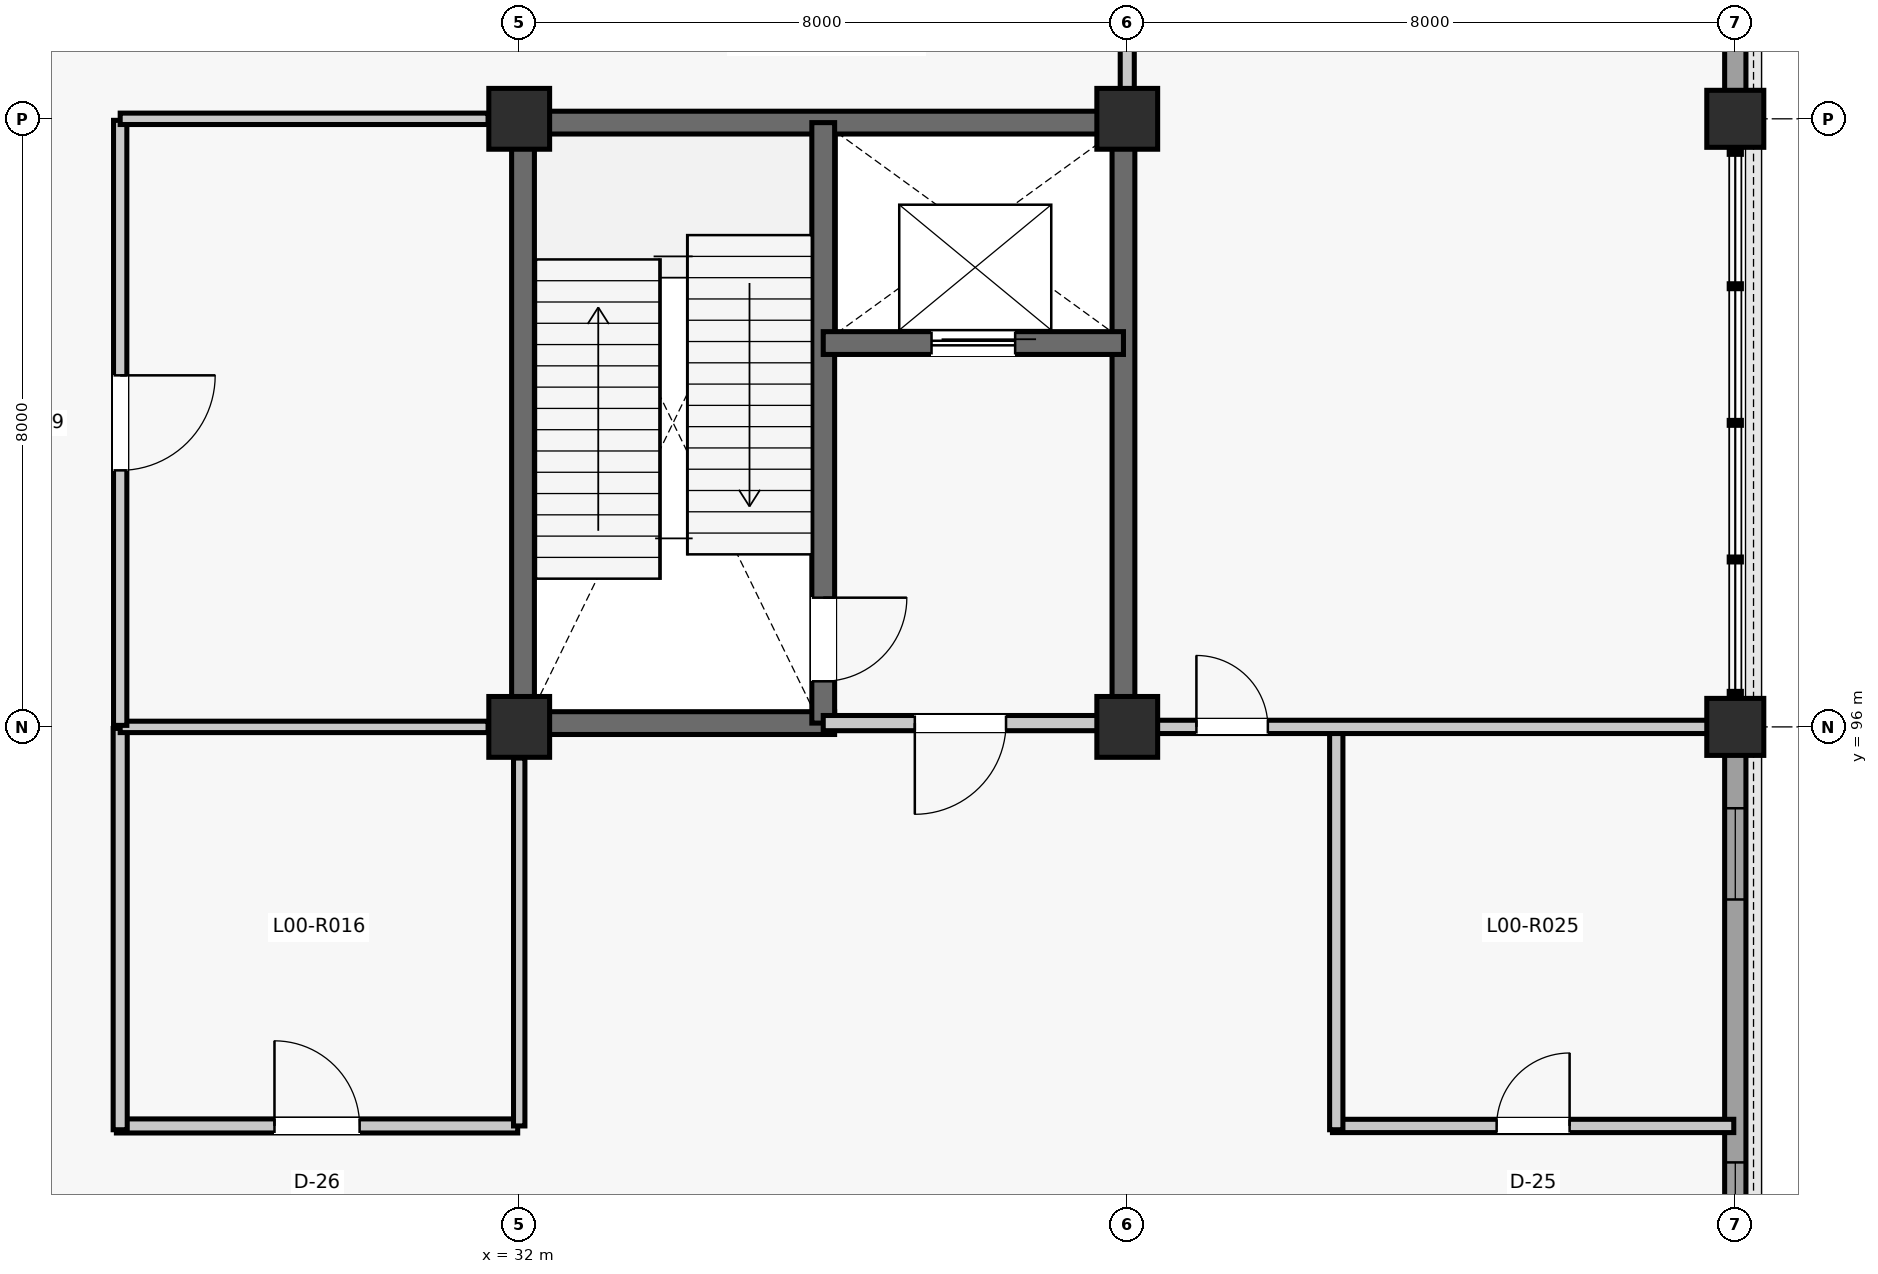
"""IFC4 building model, lengths in metres.
Left out: names, types, materials, properties, quantities, classifications, styles, units other than length and angle.
Written with IfcOpenShell. Run it as: python <this file> out.ifc"""

import sys

from ifc_helpers import new_model, si_unit, direction, frame, frame_2d, origin, origin_2d, place, context, subcontext, project, spatial, rectangle, extrude, element, fill, save


model = new_model("IFC4")
c1 = context("Model", 3, precision=1e-05, world=origin(), true_north=direction((0.0, 1.0)))
c2 = subcontext(c1, "Body", "Model", "MODEL_VIEW")
j1 = project(units=[si_unit("LENGTHUNIT", "METRE"), si_unit("PLANEANGLEUNIT", "RADIAN")], contexts=[c1])
p1 = place(None, origin())
s1 = spatial("IfcSite", under=j1, at=p1, CompositionType="ELEMENT")
p2 = place(p1, origin())
s2 = spatial("IfcBuilding", under=s1, at=p2, CompositionType="ELEMENT")
p3 = place(p2, origin())
s3 = spatial("IfcBuildingStorey", under=s2, at=p3, CompositionType="ELEMENT", Elevation=0.0)
for number, where, z_axis, x_axis in (
    (1, (32.0, 96.0, 0.0), (0.0, 0.0, 1.0), (1.0, 0.0, 0.0)),
    (2, (32.0, 104.0, 0.0), (0.0, 0.0, 1.0), (1.0, 0.0, 0.0)),
    (3, (40.0, 96.0, 0.0), (0.0, 0.0, 1.0), (1.0, 0.0, 0.0)),
    (4, (40.0, 104.0, 0.0), (0.0, 0.0, 1.0), (1.0, 0.0, 0.0)),
):
    element("IfcColumn", number, at=place(p3, frame(where, z_axis=z_axis, x_axis=x_axis)), inside=s3, PredefinedType="COLUMN", context=c2, shape_type="SweptSolid", body=[
        extrude(rectangle(XDim=0.8, YDim=0.8, at=origin_2d()), origin(), (0.0, 0.0, 1.0), 5.28),
    ])
for number, where, z_axis, x_axis in (
    (5, (48.0, 96.0, 0.0), (0.0, 0.0, 1.0), (1.0, 0.0, 0.0)),
    (6, (48.0, 104.0, 0.0), (0.0, 0.0, 1.0), (1.0, 0.0, 0.0)),
):
    element("IfcColumn", number, at=place(p3, frame(where, z_axis=z_axis, x_axis=x_axis)), inside=s3, PredefinedType="COLUMN", context=c2, shape_type="SweptSolid", body=[
        extrude(rectangle(XDim=0.75, YDim=0.75, at=origin_2d()), origin(), (0.0, 0.0, 1.0), 5.28),
    ])
p4 = place(p3, frame((48.0, 88.36, 0.0), z_axis=(0.0, 0.0, 1.0), x_axis=(0.0, 1.0, 0.0)))
e7 = element("IfcWall", 7, at=p4, inside=s3, PredefinedType="SOLIDWALL", context=c2, shape_type="SweptSolid", body=[
    extrude(rectangle(XDim=7.28, YDim=0.28, at=frame_2d((3.64, 0.0))), origin(), (0.0, 0.0, 1.0), 4.674),
])
p5 = place(p4, frame((0.71, 0.0, 0.95)))
e8 = element("IfcOpeningElement", 8, at=p5, cuts=e7, PredefinedType="OPENING", context=c2, shape_type="SweptSolid", body=[
    extrude(rectangle(XDim=1.2, YDim=1.8, at=frame_2d((0.6, 0.9))), frame((0.0, 0.15, 0.0), z_axis=(0.0, -1.0, 0.0), x_axis=(1.0, 0.0, 0.0)), (0.0, 0.0, 1.0), 0.3),
])
p6 = place(p4, frame((5.37, 0.0, 0.95)))
e9 = element("IfcOpeningElement", 9, at=p6, cuts=e7, PredefinedType="OPENING", context=c2, shape_type="SweptSolid", body=[
    extrude(rectangle(XDim=1.2, YDim=1.8, at=frame_2d((0.6, 0.9))), frame((0.0, 0.15, 0.0), z_axis=(0.0, -1.0, 0.0), x_axis=(1.0, 0.0, 0.0)), (0.0, 0.0, 1.0), 0.3),
])
p7 = place(p3, frame((48.0, 104.36, 0.0), z_axis=(0.0, 0.0, 1.0), x_axis=(0.0, 1.0, 0.0)))
e10 = element("IfcWall", 10, at=p7, inside=s3, PredefinedType="SOLIDWALL", context=c2, shape_type="SweptSolid", body=[
    extrude(rectangle(XDim=7.28, YDim=0.28, at=frame_2d((3.64, 0.0))), origin(), (0.0, 0.0, 1.0), 4.677),
])
p8 = place(p7, frame((2.715, 0.0, 0.9)))
e11 = element("IfcOpeningElement", 11, at=p8, cuts=e10, PredefinedType="OPENING", context=c2, shape_type="SweptSolid", body=[
    extrude(rectangle(XDim=1.85, YDim=2.65, at=frame_2d((0.925, 1.325))), frame((0.0, 0.15, 0.0), z_axis=(0.0, -1.0, 0.0), x_axis=(1.0, 0.0, 0.0)), (0.0, 0.0, 1.0), 0.3),
])
for number, where, z_axis, x_axis in (
    (12, (32.05, 96.29, 0.0), (0.0, 0.0, 1.0), (0.0, 1.0, 0.0)),
    (13, (32.29, 103.95, 0.0), (0.0, 0.0, 1.0), (1.0, 0.0, 0.0)),
    (14, (39.95, 96.29, 0.0), (0.0, 0.0, 1.0), (0.0, 1.0, 0.0)),
):
    element("IfcWall", number, at=place(p3, frame(where, z_axis=z_axis, x_axis=x_axis)), inside=s3, PredefinedType="SHEAR", context=c2, shape_type="SweptSolid", body=[
        extrude(rectangle(XDim=7.42, YDim=0.3, at=frame_2d((3.71, 0.0))), origin(), (0.0, 0.0, 1.0), 5.035),
    ])
p9 = place(p3, frame((32.29, 96.05, 0.0), z_axis=(0.0, 0.0, 1.0), x_axis=(1.0, 0.0, 0.0)))
e15 = element("IfcWall", 15, at=p9, inside=s3, PredefinedType="SHEAR", context=c2, shape_type="SweptSolid", body=[
    extrude(rectangle(XDim=3.86, YDim=0.3, at=frame_2d((1.93, 0.0))), origin(), (0.0, 0.0, 1.0), 5.035),
])
p10 = place(p3, frame((36.0, 96.05, 0.0), z_axis=(0.0, 0.0, 1.0), x_axis=(0.0, 1.0, 0.0)))
e16 = element("IfcWall", 16, at=p10, inside=s3, PredefinedType="SHEAR", context=c2, shape_type="SweptSolid", body=[
    extrude(rectangle(XDim=7.9, YDim=0.3, at=frame_2d((3.95, 0.0))), origin(), (0.0, 0.0, 1.0), 5.035),
])
p11 = place(p10, frame((0.55, 0.0, 0.0)))
e17 = element("IfcOpeningElement", 17, at=p11, cuts=e16, PredefinedType="OPENING", context=c2, shape_type="SweptSolid", body=[
    extrude(rectangle(XDim=1.1, YDim=2.15, at=frame_2d((0.55, 1.075))), frame((0.0, 0.16, 0.0), z_axis=(0.0, -1.0, 0.0), x_axis=(1.0, 0.0, 0.0)), (0.0, 0.0, 1.0), 0.32),
])
p12 = place(p3, frame((36.0, 101.05, 0.0), z_axis=(0.0, 0.0, 1.0), x_axis=(1.0, 0.0, 0.0)))
e18 = element("IfcWall", 18, at=p12, inside=s3, PredefinedType="SHEAR", context=c2, shape_type="SweptSolid", body=[
    extrude(rectangle(XDim=3.95, YDim=0.3, at=frame_2d((1.975, 0.0))), origin(), (0.0, 0.0, 1.0), 5.035),
])
p13 = place(p12, frame((1.425, 0.0, 0.0)))
e19 = element("IfcOpeningElement", 19, at=p13, cuts=e18, PredefinedType="OPENING", context=c2, shape_type="SweptSolid", body=[
    extrude(rectangle(XDim=1.1, YDim=2.2, at=frame_2d((0.55, 1.1))), frame((0.0, 0.16, 0.0), z_axis=(0.0, -1.0, 0.0), x_axis=(1.0, 0.0, 0.0)), (0.0, 0.0, 1.0), 0.32),
])
p14 = place(p3, frame((36.0, 96.05, 0.0), z_axis=(0.0, 0.0, 1.0), x_axis=(1.0, 0.0, 0.0)))
e20 = element("IfcWall", 20, at=p14, inside=s3, PredefinedType="PARTITIONING", context=c2, shape_type="SweptSolid", body=[
    extrude(rectangle(XDim=3.61, YDim=0.2, at=frame_2d((1.805, 0.0))), origin(), (0.0, 0.0, 1.0), 4.327),
])
p15 = place(p14, frame((1.205, 0.0, 0.0)))
e21 = element("IfcOpeningElement", 21, at=p15, cuts=e20, PredefinedType="OPENING", context=c2, shape_type="SweptSolid", body=[
    extrude(rectangle(XDim=1.2, YDim=2.15, at=frame_2d((0.6, 1.075))), frame((0.0, 0.11, 0.0), z_axis=(0.0, -1.0, 0.0), x_axis=(1.0, 0.0, 0.0)), (0.0, 0.0, 1.0), 0.22),
])
p16 = place(p3, frame((26.7, 90.75, 0.0), z_axis=(0.0, 0.0, 1.0), x_axis=(1.0, 0.0, 0.0)))
e22 = element("IfcWall", 22, at=p16, inside=s3, PredefinedType="PARTITIONING", context=c2, shape_type="SweptSolid", body=[
    extrude(rectangle(XDim=5.28, YDim=0.185, at=frame_2d((2.64, 0.0))), origin(), (0.0, 0.0, 1.0), 4.471),
])
p17 = place(p16, frame((2.08, 0.0, 0.0)))
e23 = element("IfcOpeningElement", 23, at=p17, cuts=e22, PredefinedType="OPENING", context=c2, shape_type="SweptSolid", body=[
    extrude(rectangle(XDim=1.12, YDim=2.22, at=frame_2d((0.56, 1.11))), frame((0.0, 0.103, 0.0), z_axis=(0.0, -1.0, 0.0), x_axis=(1.0, 0.0, 0.0)), (0.0, 0.0, 1.0), 0.205),
])
p18 = place(p3, frame((26.75, 90.7, 0.0), z_axis=(0.0, 0.0, 1.0), x_axis=(0.0, 1.0, 0.0)))
e24 = element("IfcWall", 24, at=p18, inside=s3, PredefinedType="PARTITIONING", context=c2, shape_type="SweptSolid", body=[
    extrude(rectangle(XDim=5.28, YDim=0.185, at=frame_2d((2.64, 0.0))), origin(), (0.0, 0.0, 1.0), 4.404),
])
p19 = place(p3, frame((26.75, 96.0, 0.0), z_axis=(0.0, 0.0, 1.0), x_axis=(1.0, 0.0, 0.0)))
e25 = element("IfcWall", 25, at=p19, inside=s3, PredefinedType="PARTITIONING", context=c2, shape_type="SweptSolid", body=[
    extrude(rectangle(XDim=4.84, YDim=0.15, at=frame_2d((2.42, 0.0))), origin(), (0.0, 0.0, 1.0), 4.404),
])
p20 = place(p3, frame((32.0, 90.75, 0.0), z_axis=(0.0, 0.0, 1.0), x_axis=(0.0, 1.0, 0.0)))
e26 = element("IfcWall", 26, at=p20, inside=s3, PredefinedType="PARTITIONING", context=c2, shape_type="SweptSolid", body=[
    extrude(rectangle(XDim=4.84, YDim=0.15, at=frame_2d((2.42, 0.0))), origin(), (0.0, 0.0, 1.0), 4.471),
])
p21 = place(p3, frame((26.75, 96.02, 0.0), z_axis=(0.0, 0.0, 1.0), x_axis=(0.0, 1.0, 0.0)))
e27 = element("IfcWall", 27, at=p21, inside=s3, PredefinedType="PARTITIONING", context=c2, shape_type="SweptSolid", body=[
    extrude(rectangle(XDim=7.96, YDim=0.175, at=frame_2d((3.98, 0.0))), origin(), (0.0, 0.0, 1.0), 4.327),
])
p22 = place(p21, frame((3.355, 0.0, 0.0)))
e28 = element("IfcOpeningElement", 28, at=p22, cuts=e27, PredefinedType="OPENING", context=c2, shape_type="SweptSolid", body=[
    extrude(rectangle(XDim=1.25, YDim=2.18, at=frame_2d((0.625, 1.09))), frame((0.0, 0.097, 0.0), z_axis=(0.0, -1.0, 0.0), x_axis=(1.0, 0.0, 0.0)), (0.0, 0.0, 1.0), 0.195),
])
p23 = place(p3, frame((26.75, 104.0, 0.0), z_axis=(0.0, 0.0, 1.0), x_axis=(1.0, 0.0, 0.0)))
e29 = element("IfcWall", 29, at=p23, inside=s3, PredefinedType="PARTITIONING", context=c2, shape_type="SweptSolid", body=[
    extrude(rectangle(XDim=4.84, YDim=0.15, at=frame_2d((2.42, 0.0))), origin(), (0.0, 0.0, 1.0), 4.327),
])
p24 = place(p3, frame((42.7, 90.75, 0.0), z_axis=(0.0, 0.0, 1.0), x_axis=(1.0, 0.0, 0.0)))
e30 = element("IfcWall", 30, at=p24, inside=s3, PredefinedType="PARTITIONING", context=c2, shape_type="SweptSolid", body=[
    extrude(rectangle(XDim=5.28, YDim=0.175, at=frame_2d((2.64, 0.0))), origin(), (0.0, 0.0, 1.0), 4.667),
])
p25 = place(p24, frame((2.16, 0.0, 0.0)))
e31 = element("IfcOpeningElement", 31, at=p25, cuts=e30, PredefinedType="OPENING", context=c2, shape_type="SweptSolid", body=[
    extrude(rectangle(XDim=0.96, YDim=2.14, at=frame_2d((0.48, 1.07))), frame((0.0, 0.097, 0.0), z_axis=(0.0, -1.0, 0.0), x_axis=(1.0, 0.0, 0.0)), (0.0, 0.0, 1.0), 0.195),
])
p26 = place(p3, frame((42.75, 90.7, 0.0), z_axis=(0.0, 0.0, 1.0), x_axis=(0.0, 1.0, 0.0)))
e32 = element("IfcWall", 32, at=p26, inside=s3, PredefinedType="PARTITIONING", context=c2, shape_type="SweptSolid", body=[
    extrude(rectangle(XDim=5.28, YDim=0.175, at=frame_2d((2.64, 0.0))), origin(), (0.0, 0.0, 1.0), 4.403),
])
p27 = place(p3, frame((40.0, 104.39, 0.0), z_axis=(0.0, 0.0, 1.0), x_axis=(0.0, 1.0, 0.0)))
e33 = element("IfcWall", 33, at=p27, inside=s3, PredefinedType="PARTITIONING", context=c2, shape_type="SweptSolid", body=[
    extrude(rectangle(XDim=7.245, YDim=0.185, at=frame_2d((3.623, 0.0))), origin(), (0.0, 0.0, 1.0), 4.404),
])
p28 = place(p27, frame((2.972, 0.0, 0.0)))
e34 = element("IfcOpeningElement", 34, at=p28, cuts=e33, PredefinedType="OPENING", context=c2, shape_type="SweptSolid", body=[
    extrude(rectangle(XDim=1.3, YDim=2.2, at=frame_2d((0.65, 1.1))), frame((0.0, 0.103, 0.0), z_axis=(0.0, -1.0, 0.0), x_axis=(1.0, 0.0, 0.0)), (0.0, 0.0, 1.0), 0.205),
])
p29 = place(p3, frame((40.39, 96.0, 0.0), z_axis=(0.0, 0.0, 1.0), x_axis=(1.0, 0.0, 0.0)))
e35 = element("IfcWall", 35, at=p29, inside=s3, PredefinedType="PARTITIONING", context=c2, shape_type="SweptSolid", body=[
    extrude(rectangle(XDim=7.245, YDim=0.175, at=frame_2d((3.623, 0.0))), origin(), (0.0, 0.0, 1.0), 4.403),
])
p30 = place(p29, frame((0.52, 0.0, 0.0)))
e36 = element("IfcOpeningElement", 36, at=p30, cuts=e35, PredefinedType="OPENING", context=c2, shape_type="SweptSolid", body=[
    extrude(rectangle(XDim=0.94, YDim=2.12, at=frame_2d((0.47, 1.06))), frame((0.0, 0.097, 0.0), z_axis=(0.0, -1.0, 0.0), x_axis=(1.0, 0.0, 0.0)), (0.0, 0.0, 1.0), 0.195),
])
p31 = place(p5, origin())
e37 = element("IfcWindow", 37, at=p31, inside=s3, PartitioningType="SINGLE_PANEL", PredefinedType="WINDOW", context=c2, shape_type="SweptSolid", body=[
    extrude(rectangle(XDim=1.2, YDim=1.8, at=frame_2d((0.6, 0.9))), frame((0.0, 0.03, 0.0), z_axis=(0.0, -1.0, 0.0), x_axis=(1.0, 0.0, 0.0)), (0.0, 0.0, 1.0), 0.06),
])
fill(e8, e37)
p32 = place(p6, origin())
e38 = element("IfcWindow", 38, at=p32, inside=s3, PartitioningType="SINGLE_PANEL", PredefinedType="WINDOW", context=c2, shape_type="SweptSolid", body=[
    extrude(rectangle(XDim=1.2, YDim=1.8, at=frame_2d((0.6, 0.9))), frame((0.0, 0.03, 0.0), z_axis=(0.0, -1.0, 0.0), x_axis=(1.0, 0.0, 0.0)), (0.0, 0.0, 1.0), 0.06),
])
fill(e9, e38)
p33 = place(p11, frame((1.1, 0.0, 0.0), z_axis=(0.0, 0.0, 1.0), x_axis=(-1.0, 0.0, 0.0)))
e39 = element("IfcDoor", 39, at=p33, inside=s3, OperationType="SINGLE_SWING_RIGHT", PredefinedType="DOOR", context=c2, shape_type="SweptSolid", body=[
    extrude(rectangle(XDim=1.1, YDim=2.15, at=frame_2d((0.55, 1.075))), frame((0.0, 0.025, 0.0), z_axis=(0.0, -1.0, 0.0), x_axis=(1.0, 0.0, 0.0)), (0.0, 0.0, 1.0), 0.05),
])
fill(e17, e39)
p34 = place(p13, origin())
e40 = element("IfcDoor", 40, at=p34, inside=s3, OperationType="SLIDING_TO_LEFT", PredefinedType="DOOR", context=c2, shape_type="SweptSolid", body=[
    extrude(rectangle(XDim=1.1, YDim=2.2, at=frame_2d((0.55, 1.1))), frame((0.0, 0.025, 0.0), z_axis=(0.0, -1.0, 0.0), x_axis=(1.0, 0.0, 0.0)), (0.0, 0.0, 1.0), 0.05),
])
fill(e19, e40)
p35 = place(p15, frame((1.2, 0.0, 0.0), z_axis=(0.0, 0.0, 1.0), x_axis=(-1.0, 0.0, 0.0)))
e41 = element("IfcDoor", 41, at=p35, inside=s3, OperationType="SINGLE_SWING_LEFT", PredefinedType="DOOR", context=c2, shape_type="SweptSolid", body=[
    extrude(rectangle(XDim=1.2, YDim=2.15, at=frame_2d((0.6, 1.075))), frame((0.0, 0.025, 0.0), z_axis=(0.0, -1.0, 0.0), x_axis=(1.0, 0.0, 0.0)), (0.0, 0.0, 1.0), 0.05),
])
fill(e21, e41)
p36 = place(p17, origin())
e42 = element("IfcDoor", 42, at=p36, inside=s3, OperationType="SINGLE_SWING_LEFT", PredefinedType="DOOR", context=c2, shape_type="SweptSolid", body=[
    extrude(rectangle(XDim=1.12, YDim=2.22, at=frame_2d((0.56, 1.11))), frame((0.0, 0.025, 0.0), z_axis=(0.0, -1.0, 0.0), x_axis=(1.0, 0.0, 0.0)), (0.0, 0.0, 1.0), 0.05),
])
fill(e23, e42)
p37 = place(p22, frame((1.25, 0.0, 0.0), z_axis=(0.0, 0.0, 1.0), x_axis=(-1.0, 0.0, 0.0)))
e43 = element("IfcDoor", 43, at=p37, inside=s3, OperationType="SINGLE_SWING_RIGHT", PredefinedType="DOOR", context=c2, shape_type="SweptSolid", body=[
    extrude(rectangle(XDim=1.25, YDim=2.18, at=frame_2d((0.625, 1.09))), frame((0.0, 0.025, 0.0), z_axis=(0.0, -1.0, 0.0), x_axis=(1.0, 0.0, 0.0)), (0.0, 0.0, 1.0), 0.05),
])
fill(e28, e43)
p38 = place(p25, origin())
e44 = element("IfcDoor", 44, at=p38, inside=s3, OperationType="SINGLE_SWING_RIGHT", PredefinedType="DOOR", context=c2, shape_type="SweptSolid", body=[
    extrude(rectangle(XDim=0.96, YDim=2.14, at=frame_2d((0.48, 1.07))), frame((0.0, 0.025, 0.0), z_axis=(0.0, -1.0, 0.0), x_axis=(1.0, 0.0, 0.0)), (0.0, 0.0, 1.0), 0.05),
])
fill(e31, e44)
p39 = place(p30, origin())
e45 = element("IfcDoor", 45, at=p39, inside=s3, OperationType="SINGLE_SWING_LEFT", PredefinedType="DOOR", context=c2, shape_type="SweptSolid", body=[
    extrude(rectangle(XDim=0.94, YDim=2.12, at=frame_2d((0.47, 1.06))), frame((0.0, 0.025, 0.0), z_axis=(0.0, -1.0, 0.0), x_axis=(1.0, 0.0, 0.0)), (0.0, 0.0, 1.0), 0.05),
])
fill(e36, e45)
save(model, sys.argv[1])
